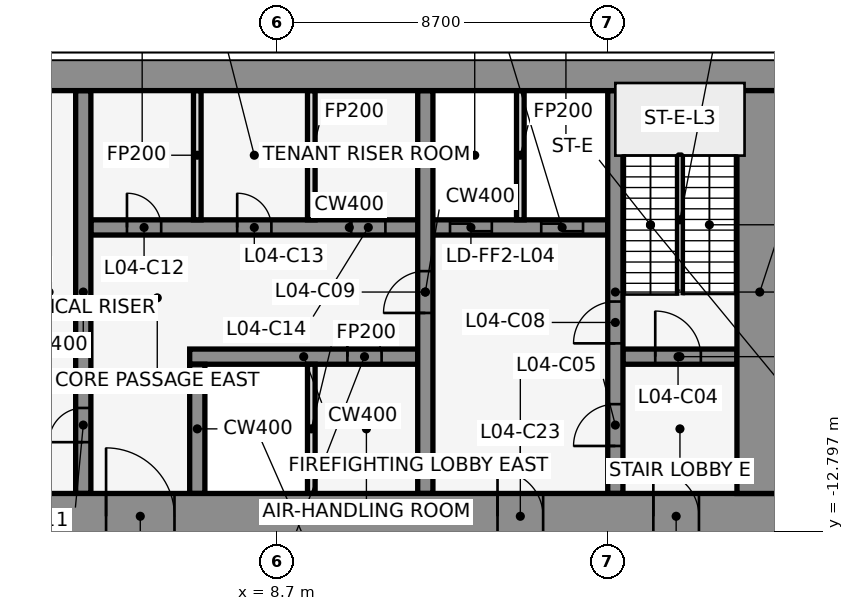
"""IFC4 building model, lengths in metres.
Left out: names, types, materials, properties, quantities, classifications, styles, units other than length and angle.
Written with IfcOpenShell. Run it as: python <this file> out.ifc"""

import sys

from ifc_helpers import new_model, si_unit, direction, frame, frame_2d, origin, place, context, subcontext, project, spatial, rectangle, extrude, element, fill, save


model = new_model("IFC4")
c1 = context("Model", 3, precision=1e-05, world=origin(), true_north=direction((0.0, 1.0)))
c2 = subcontext(c1, "Body", "Model", "MODEL_VIEW")
j1 = project(units=[si_unit("LENGTHUNIT", "METRE"), si_unit("PLANEANGLEUNIT", "RADIAN")], contexts=[c1])
p1 = place(None, origin())
s1 = spatial("IfcSite", under=j1, at=p1, CompositionType="ELEMENT")
p2 = place(p1, origin())
s2 = spatial("IfcBuilding", under=s1, at=p2, CompositionType="ELEMENT")
p3 = place(p2, frame((0.0, 0.0, 25.0)))
s3 = spatial("IfcBuildingStorey", under=s2, at=p3, CompositionType="ELEMENT", Elevation=25.0)
p4 = place(p3, frame((6.4, -8.2, 0.0), z_axis=(0.0, 0.0, 1.0), x_axis=(1.0, 0.0, 0.0)))
e1 = element("IfcWall", 1, at=p4, inside=s3, PredefinedType="SHEAR", context=c2, shape_type="SweptSolid", body=[
    extrude(rectangle(XDim=6.0, YDim=0.4, at=frame_2d((3.0, 0.0))), origin(), (0.0, 0.0, 1.0), 5.0),
])
p5 = place(p4, frame((4.15, 0.0, 0.0)))
e2 = element("IfcOpeningElement", 2, at=p5, cuts=e1, PredefinedType="OPENING", context=c2, shape_type="SweptSolid", body=[
    extrude(rectangle(XDim=0.9, YDim=2.1, at=frame_2d((0.45, 1.05))), frame((0.0, 0.212, 0.0), z_axis=(0.0, -1.0, 0.0), x_axis=(1.0, 0.0, 0.0)), (0.0, 0.0, 1.0), 0.424),
])
p6 = place(p3, frame((17.8, -8.2, 0.0), z_axis=(0.0, 0.0, 1.0), x_axis=(1.0, 0.0, 0.0)))
e3 = element("IfcWall", 3, at=p6, inside=s3, PredefinedType="SHEAR", context=c2, shape_type="SweptSolid", body=[
    extrude(rectangle(XDim=3.0, YDim=0.4, at=frame_2d((1.5, 0.0))), origin(), (0.0, 0.0, 1.0), 5.0),
])
p7 = place(p6, frame((0.85, 0.0, 0.0)))
e4 = element("IfcOpeningElement", 4, at=p7, cuts=e3, PredefinedType="OPENING", context=c2, shape_type="SweptSolid", body=[
    extrude(rectangle(XDim=1.2, YDim=2.1, at=frame_2d((0.6, 1.05))), frame((0.0, 0.212, 0.0), z_axis=(0.0, -1.0, 0.0), x_axis=(1.0, 0.0, 0.0)), (0.0, 0.0, 1.0), 0.424),
])
p8 = place(p3, frame((3.8, -4.8, 0.0), z_axis=(0.0, 0.0, 1.0), x_axis=(1.0, 0.0, 0.0)))
e5 = element("IfcWall", 5, at=p8, inside=s3, PredefinedType="SHEAR", context=c2, shape_type="SweptSolid", body=[
    extrude(rectangle(XDim=13.6, YDim=0.4, at=frame_2d((6.8, 0.0))), origin(), (0.0, 0.0, 1.0), 5.0),
])
p9 = place(p8, frame((9.45, 0.0, 0.0)))
e6 = element("IfcOpeningElement", 6, at=p9, cuts=e5, PredefinedType="OPENING", context=c2, shape_type="SweptSolid", body=[
    extrude(rectangle(XDim=1.1, YDim=2.1, at=frame_2d((0.55, 1.05))), frame((0.0, 0.212, 0.0), z_axis=(0.0, -1.0, 0.0), x_axis=(1.0, 0.0, 0.0)), (0.0, 0.0, 1.0), 0.424),
])
p10 = place(p8, frame((11.85, 0.0, 0.0)))
e7 = element("IfcOpeningElement", 7, at=p10, cuts=e5, PredefinedType="OPENING", context=c2, shape_type="SweptSolid", body=[
    extrude(rectangle(XDim=1.1, YDim=2.1, at=frame_2d((0.55, 1.05))), frame((0.0, 0.212, 0.0), z_axis=(0.0, -1.0, 0.0), x_axis=(1.0, 0.0, 0.0)), (0.0, 0.0, 1.0), 0.424),
])
p11 = place(p8, frame((0.95, 0.0, 0.0)))
e8 = element("IfcOpeningElement", 8, at=p11, cuts=e5, PredefinedType="OPENING", context=c2, shape_type="SweptSolid", body=[
    extrude(rectangle(XDim=0.9, YDim=2.1, at=frame_2d((0.45, 1.05))), frame((0.0, 0.212, 0.0), z_axis=(0.0, -1.0, 0.0), x_axis=(1.0, 0.0, 0.0)), (0.0, 0.0, 1.0), 0.424),
])
p12 = place(p8, frame((3.85, 0.0, 0.0)))
e9 = element("IfcOpeningElement", 9, at=p12, cuts=e5, PredefinedType="OPENING", context=c2, shape_type="SweptSolid", body=[
    extrude(rectangle(XDim=0.9, YDim=2.1, at=frame_2d((0.45, 1.05))), frame((0.0, 0.212, 0.0), z_axis=(0.0, -1.0, 0.0), x_axis=(1.0, 0.0, 0.0)), (0.0, 0.0, 1.0), 0.424),
])
p13 = place(p8, frame((6.85, 0.0, 0.0)))
e10 = element("IfcOpeningElement", 10, at=p13, cuts=e5, PredefinedType="OPENING", context=c2, shape_type="SweptSolid", body=[
    extrude(rectangle(XDim=0.9, YDim=2.1, at=frame_2d((0.45, 1.05))), frame((0.0, 0.212, 0.0), z_axis=(0.0, -1.0, 0.0), x_axis=(1.0, 0.0, 0.0)), (0.0, 0.0, 1.0), 0.424),
])
p14 = place(p3, frame((3.6, -11.8, 0.0), z_axis=(0.0, 0.0, 1.0), x_axis=(0.0, 1.0, 0.0)))
e11 = element("IfcWall", 11, at=p14, inside=s3, PredefinedType="SHEAR", context=c2, shape_type="SweptSolid", body=[
    extrude(rectangle(XDim=10.6, YDim=0.4, at=frame_2d((5.3, 0.0))), origin(), (0.0, 0.0, 1.0), 5.0),
])
p15 = place(p14, frame((1.35, 0.0, 0.0)))
e12 = element("IfcOpeningElement", 12, at=p15, cuts=e11, PredefinedType="OPENING", context=c2, shape_type="SweptSolid", body=[
    extrude(rectangle(XDim=0.9, YDim=2.1, at=frame_2d((0.45, 1.05))), frame((0.0, 0.212, 0.0), z_axis=(0.0, -1.0, 0.0), x_axis=(1.0, 0.0, 0.0)), (0.0, 0.0, 1.0), 0.424),
])
p16 = place(p3, frame((6.6, -11.8, 0.0), z_axis=(0.0, 0.0, 1.0), x_axis=(0.0, 1.0, 0.0)))
e13 = element("IfcWall", 13, at=p16, inside=s3, PredefinedType="SHEAR", context=c2, shape_type="SweptSolid", body=[
    extrude(rectangle(XDim=3.4, YDim=0.4, at=frame_2d((1.7, 0.0))), origin(), (0.0, 0.0, 1.0), 5.0),
])
for number, where, z_axis, x_axis in (
    (14, (6.6, -4.6, 0.0), (0.0, 0.0, 1.0), (0.0, 1.0, 0.0)),
    (15, (9.6, -11.8, 0.0), (0.0, 0.0, 1.0), (0.0, 1.0, 0.0)),
    (16, (9.6, -4.6, 0.0), (0.0, 0.0, 1.0), (0.0, 1.0, 0.0)),
):
    element("IfcWall", number, at=place(p3, frame(where, z_axis=z_axis, x_axis=x_axis)), inside=s3, PredefinedType="PARTITIONING", context=c2, shape_type="SweptSolid", body=[
        extrude(rectangle(XDim=3.4, YDim=0.2, at=frame_2d((1.7, 0.0))), origin(), (0.0, 0.0, 1.0), 4.7),
    ])
p17 = place(p3, frame((12.6, -11.8, 0.0), z_axis=(0.0, 0.0, 1.0), x_axis=(0.0, 1.0, 0.0)))
e17 = element("IfcWall", 17, at=p17, inside=s3, PredefinedType="SHEAR", context=c2, shape_type="SweptSolid", body=[
    extrude(rectangle(XDim=10.6, YDim=0.4, at=frame_2d((5.3, 0.0))), origin(), (0.0, 0.0, 1.0), 5.0),
])
p18 = place(p17, frame((4.75, 0.0, 0.0)))
e18 = element("IfcOpeningElement", 18, at=p18, cuts=e17, PredefinedType="OPENING", context=c2, shape_type="SweptSolid", body=[
    extrude(rectangle(XDim=1.1, YDim=2.1, at=frame_2d((0.55, 1.05))), frame((0.0, 0.212, 0.0), z_axis=(0.0, -1.0, 0.0), x_axis=(1.0, 0.0, 0.0)), (0.0, 0.0, 1.0), 0.424),
])
p19 = place(p3, frame((15.1, -4.6, 0.0), z_axis=(0.0, 0.0, 1.0), x_axis=(0.0, 1.0, 0.0)))
e19 = element("IfcWall", 19, at=p19, inside=s3, PredefinedType="PARTITIONING", context=c2, shape_type="SweptSolid", body=[
    extrude(rectangle(XDim=3.4, YDim=0.2, at=frame_2d((1.7, 0.0))), origin(), (0.0, 0.0, 1.0), 4.7),
])
p20 = place(p3, frame((17.6, -11.8, 0.0), z_axis=(0.0, 0.0, 1.0), x_axis=(0.0, 1.0, 0.0)))
e20 = element("IfcWall", 20, at=p20, inside=s3, PredefinedType="SHEAR", context=c2, shape_type="SweptSolid", body=[
    extrude(rectangle(XDim=10.6, YDim=0.4, at=frame_2d((5.3, 0.0))), origin(), (0.0, 0.0, 1.0), 5.0),
])
p21 = place(p20, frame((1.25, 0.0, 0.0)))
e21 = element("IfcOpeningElement", 21, at=p21, cuts=e20, PredefinedType="OPENING", context=c2, shape_type="SweptSolid", body=[
    extrude(rectangle(XDim=1.1, YDim=2.1, at=frame_2d((0.55, 1.05))), frame((0.0, 0.212, 0.0), z_axis=(0.0, -1.0, 0.0), x_axis=(1.0, 0.0, 0.0)), (0.0, 0.0, 1.0), 0.424),
])
p22 = place(p20, frame((3.95, 0.0, 0.0)))
e22 = element("IfcOpeningElement", 22, at=p22, cuts=e20, PredefinedType="OPENING", context=c2, shape_type="SweptSolid", body=[
    extrude(rectangle(XDim=1.1, YDim=2.1, at=frame_2d((0.55, 1.05))), frame((0.0, 0.212, 0.0), z_axis=(0.0, -1.0, 0.0), x_axis=(1.0, 0.0, 0.0)), (0.0, 0.0, 1.0), 0.424),
])
p23 = place(p3, frame((-22.0, -0.6, 0.0), z_axis=(0.0, 0.0, 1.0), x_axis=(1.0, 0.0, 0.0)))
e23 = element("IfcWall", 23, at=p23, inside=s3, PredefinedType="SHEAR", context=c2, shape_type="SweptSolid", body=[
    extrude(rectangle(XDim=44.0, YDim=1.2, at=frame_2d((22.0, 0.0))), origin(), (0.0, 0.0, 1.0), 5.0),
])
p24 = place(p3, frame((-22.0, -12.4, 0.0), z_axis=(0.0, 0.0, 1.0), x_axis=(1.0, 0.0, 0.0)))
e24 = element("IfcWall", 24, at=p24, inside=s3, PredefinedType="SHEAR", context=c2, shape_type="SweptSolid", body=[
    extrude(rectangle(XDim=44.0, YDim=1.2, at=frame_2d((22.0, 0.0))), origin(), (0.0, 0.0, 1.0), 5.0),
])
p25 = place(p24, frame((2.2, 0.0, 0.0)))
e25 = element("IfcOpeningElement", 25, at=p25, cuts=e24, PredefinedType="OPENING", context=c2, shape_type="SweptSolid", body=[
    extrude(rectangle(XDim=1.2, YDim=2.1, at=frame_2d((0.6, 1.05))), frame((0.0, 0.612, 0.0), z_axis=(0.0, -1.0, 0.0), x_axis=(1.0, 0.0, 0.0)), (0.0, 0.0, 1.0), 1.224),
])
p26 = place(p24, frame((21.4, 0.0, 0.0)))
e26 = element("IfcOpeningElement", 26, at=p26, cuts=e24, PredefinedType="OPENING", context=c2, shape_type="SweptSolid", body=[
    extrude(rectangle(XDim=1.2, YDim=2.1, at=frame_2d((0.6, 1.05))), frame((0.0, 0.612, 0.0), z_axis=(0.0, -1.0, 0.0), x_axis=(1.0, 0.0, 0.0)), (0.0, 0.0, 1.0), 1.224),
])
p27 = place(p24, frame((40.6, 0.0, 0.0)))
e27 = element("IfcOpeningElement", 27, at=p27, cuts=e24, PredefinedType="OPENING", context=c2, shape_type="SweptSolid", body=[
    extrude(rectangle(XDim=1.2, YDim=2.1, at=frame_2d((0.6, 1.05))), frame((0.0, 0.612, 0.0), z_axis=(0.0, -1.0, 0.0), x_axis=(1.0, 0.0, 0.0)), (0.0, 0.0, 1.0), 1.224),
])
p28 = place(p24, frame((16.0, 0.0, 0.0)))
e28 = element("IfcOpeningElement", 28, at=p28, cuts=e24, PredefinedType="OPENING", context=c2, shape_type="SweptSolid", body=[
    extrude(rectangle(XDim=1.8, YDim=2.1, at=frame_2d((0.9, 1.05))), frame((0.0, 0.612, 0.0), z_axis=(0.0, -1.0, 0.0), x_axis=(1.0, 0.0, 0.0)), (0.0, 0.0, 1.0), 1.224),
])
p29 = place(p24, frame((6.3, 0.0, 0.0)))
e29 = element("IfcOpeningElement", 29, at=p29, cuts=e24, PredefinedType="OPENING", context=c2, shape_type="SweptSolid", body=[
    extrude(rectangle(XDim=1.2, YDim=2.1, at=frame_2d((0.6, 1.05))), frame((0.0, 0.612, 0.0), z_axis=(0.0, -1.0, 0.0), x_axis=(1.0, 0.0, 0.0)), (0.0, 0.0, 1.0), 1.224),
])
p30 = place(p24, frame((26.2, 0.0, 0.0)))
e30 = element("IfcOpeningElement", 30, at=p30, cuts=e24, PredefinedType="OPENING", context=c2, shape_type="SweptSolid", body=[
    extrude(rectangle(XDim=1.8, YDim=2.1, at=frame_2d((0.9, 1.05))), frame((0.0, 0.612, 0.0), z_axis=(0.0, -1.0, 0.0), x_axis=(1.0, 0.0, 0.0)), (0.0, 0.0, 1.0), 1.224),
])
p31 = place(p24, frame((36.5, 0.0, 0.0)))
e31 = element("IfcOpeningElement", 31, at=p31, cuts=e24, PredefinedType="OPENING", context=c2, shape_type="SweptSolid", body=[
    extrude(rectangle(XDim=1.2, YDim=2.1, at=frame_2d((0.6, 1.05))), frame((0.0, 0.612, 0.0), z_axis=(0.0, -1.0, 0.0), x_axis=(1.0, 0.0, 0.0)), (0.0, 0.0, 1.0), 1.224),
])
p32 = place(p3, frame((21.4, -11.8, 0.0), z_axis=(0.0, 0.0, 1.0), x_axis=(0.0, 1.0, 0.0)))
e32 = element("IfcWall", 32, at=p32, inside=s3, PredefinedType="SHEAR", context=c2, shape_type="SweptSolid", body=[
    extrude(rectangle(XDim=10.6, YDim=1.2, at=frame_2d((5.3, 0.0))), origin(), (0.0, 0.0, 1.0), 5.0),
])
p33 = place(p7, origin())
e33 = element("IfcDoor", 33, at=p33, inside=s3, OperationType="SINGLE_SWING_RIGHT", PredefinedType="DOOR", context=c2, shape_type="SweptSolid", body=[
    extrude(rectangle(XDim=1.2, YDim=2.1, at=frame_2d((0.6, 1.05))), frame((0.0, 0.025, 0.0), z_axis=(0.0, -1.0, 0.0), x_axis=(1.0, 0.0, 0.0)), (0.0, 0.0, 1.0), 0.05),
])
fill(e4, e33)
p34 = place(p21, origin())
e34 = element("IfcDoor", 34, at=p34, inside=s3, OperationType="SINGLE_SWING_LEFT", PredefinedType="DOOR", context=c2, shape_type="SweptSolid", body=[
    extrude(rectangle(XDim=1.1, YDim=2.1, at=frame_2d((0.55, 1.05))), frame((0.0, 0.025, 0.0), z_axis=(0.0, -1.0, 0.0), x_axis=(1.0, 0.0, 0.0)), (0.0, 0.0, 1.0), 0.05),
])
fill(e21, e34)
p35 = place(p9, origin())
e35 = element("IfcDoor", 35, at=p35, inside=s3, OperationType="DOUBLE_DOOR_SLIDING", PredefinedType="DOOR", context=c2, shape_type="SweptSolid", body=[
    extrude(rectangle(XDim=1.1, YDim=2.1, at=frame_2d((0.55, 1.05))), frame((0.0, 0.025, 0.0), z_axis=(0.0, -1.0, 0.0), x_axis=(1.0, 0.0, 0.0)), (0.0, 0.0, 1.0), 0.05),
])
fill(e6, e35)
p36 = place(p10, origin())
e36 = element("IfcDoor", 36, at=p36, inside=s3, OperationType="DOUBLE_DOOR_SLIDING", PredefinedType="DOOR", context=c2, shape_type="SweptSolid", body=[
    extrude(rectangle(XDim=1.1, YDim=2.1, at=frame_2d((0.55, 1.05))), frame((0.0, 0.025, 0.0), z_axis=(0.0, -1.0, 0.0), x_axis=(1.0, 0.0, 0.0)), (0.0, 0.0, 1.0), 0.05),
])
fill(e7, e36)
p37 = place(p22, origin())
e37 = element("IfcDoor", 37, at=p37, inside=s3, OperationType="SINGLE_SWING_RIGHT", PredefinedType="DOOR", context=c2, shape_type="SweptSolid", body=[
    extrude(rectangle(XDim=1.1, YDim=2.1, at=frame_2d((0.55, 1.05))), frame((0.0, 0.025, 0.0), z_axis=(0.0, -1.0, 0.0), x_axis=(1.0, 0.0, 0.0)), (0.0, 0.0, 1.0), 0.05),
])
fill(e22, e37)
p38 = place(p18, frame((1.1, 0.0, 0.0), z_axis=(0.0, 0.0, 1.0), x_axis=(-1.0, 0.0, 0.0)))
e38 = element("IfcDoor", 38, at=p38, inside=s3, OperationType="SINGLE_SWING_RIGHT", PredefinedType="DOOR", context=c2, shape_type="SweptSolid", body=[
    extrude(rectangle(XDim=1.1, YDim=2.1, at=frame_2d((0.55, 1.05))), frame((0.0, 0.025, 0.0), z_axis=(0.0, -1.0, 0.0), x_axis=(1.0, 0.0, 0.0)), (0.0, 0.0, 1.0), 0.05),
])
fill(e18, e38)
p39 = place(p15, origin())
e39 = element("IfcDoor", 39, at=p39, inside=s3, OperationType="SINGLE_SWING_LEFT", PredefinedType="DOOR", context=c2, shape_type="SweptSolid", body=[
    extrude(rectangle(XDim=0.9, YDim=2.1, at=frame_2d((0.45, 1.05))), frame((0.0, 0.025, 0.0), z_axis=(0.0, -1.0, 0.0), x_axis=(1.0, 0.0, 0.0)), (0.0, 0.0, 1.0), 0.05),
])
fill(e12, e39)
p40 = place(p11, origin())
e40 = element("IfcDoor", 40, at=p40, inside=s3, OperationType="SINGLE_SWING_RIGHT", PredefinedType="DOOR", context=c2, shape_type="SweptSolid", body=[
    extrude(rectangle(XDim=0.9, YDim=2.1, at=frame_2d((0.45, 1.05))), frame((0.0, 0.025, 0.0), z_axis=(0.0, -1.0, 0.0), x_axis=(1.0, 0.0, 0.0)), (0.0, 0.0, 1.0), 0.05),
])
fill(e8, e40)
p41 = place(p12, origin())
e41 = element("IfcDoor", 41, at=p41, inside=s3, OperationType="SINGLE_SWING_LEFT", PredefinedType="DOOR", context=c2, shape_type="SweptSolid", body=[
    extrude(rectangle(XDim=0.9, YDim=2.1, at=frame_2d((0.45, 1.05))), frame((0.0, 0.025, 0.0), z_axis=(0.0, -1.0, 0.0), x_axis=(1.0, 0.0, 0.0)), (0.0, 0.0, 1.0), 0.05),
])
fill(e9, e41)
p42 = place(p13, origin())
e42 = element("IfcDoor", 42, at=p42, inside=s3, OperationType="SINGLE_SWING_RIGHT", PredefinedType="DOOR", context=c2, shape_type="SweptSolid", body=[
    extrude(rectangle(XDim=0.9, YDim=2.1, at=frame_2d((0.45, 1.05))), frame((0.0, 0.025, 0.0), z_axis=(0.0, -1.0, 0.0), x_axis=(1.0, 0.0, 0.0)), (0.0, 0.0, 1.0), 0.05),
])
fill(e10, e42)
p43 = place(p5, frame((0.9, 0.0, 0.0), z_axis=(0.0, 0.0, 1.0), x_axis=(-1.0, 0.0, 0.0)))
e43 = element("IfcDoor", 43, at=p43, inside=s3, OperationType="SINGLE_SWING_LEFT", PredefinedType="DOOR", context=c2, shape_type="SweptSolid", body=[
    extrude(rectangle(XDim=0.9, YDim=2.1, at=frame_2d((0.45, 1.05))), frame((0.0, 0.025, 0.0), z_axis=(0.0, -1.0, 0.0), x_axis=(1.0, 0.0, 0.0)), (0.0, 0.0, 1.0), 0.05),
])
fill(e2, e43)
p44 = place(p27, frame((1.2, 0.0, 0.0), z_axis=(0.0, 0.0, 1.0), x_axis=(-1.0, 0.0, 0.0)))
e44 = element("IfcDoor", 44, at=p44, inside=s3, OperationType="SINGLE_SWING_RIGHT", PredefinedType="DOOR", context=c2, shape_type="SweptSolid", body=[
    extrude(rectangle(XDim=1.2, YDim=2.1, at=frame_2d((0.6, 1.05))), frame((0.0, 0.025, 0.0), z_axis=(0.0, -1.0, 0.0), x_axis=(1.0, 0.0, 0.0)), (0.0, 0.0, 1.0), 0.05),
])
fill(e27, e44)
p45 = place(p30, origin())
e45 = element("IfcDoor", 45, at=p45, inside=s3, OperationType="SINGLE_SWING_LEFT", PredefinedType="DOOR", context=c2, shape_type="SweptSolid", body=[
    extrude(rectangle(XDim=1.8, YDim=2.1, at=frame_2d((0.9, 1.05))), frame((0.0, 0.025, 0.0), z_axis=(0.0, -1.0, 0.0), x_axis=(1.0, 0.0, 0.0)), (0.0, 0.0, 1.0), 0.05),
])
fill(e30, e45)
p46 = place(p31, frame((1.2, 0.0, 0.0), z_axis=(0.0, 0.0, 1.0), x_axis=(-1.0, 0.0, 0.0)))
e46 = element("IfcDoor", 46, at=p46, inside=s3, OperationType="SINGLE_SWING_RIGHT", PredefinedType="DOOR", context=c2, shape_type="SweptSolid", body=[
    extrude(rectangle(XDim=1.2, YDim=2.1, at=frame_2d((0.6, 1.05))), frame((0.0, 0.025, 0.0), z_axis=(0.0, -1.0, 0.0), x_axis=(1.0, 0.0, 0.0)), (0.0, 0.0, 1.0), 0.05),
])
fill(e31, e46)
save(model, sys.argv[1])
